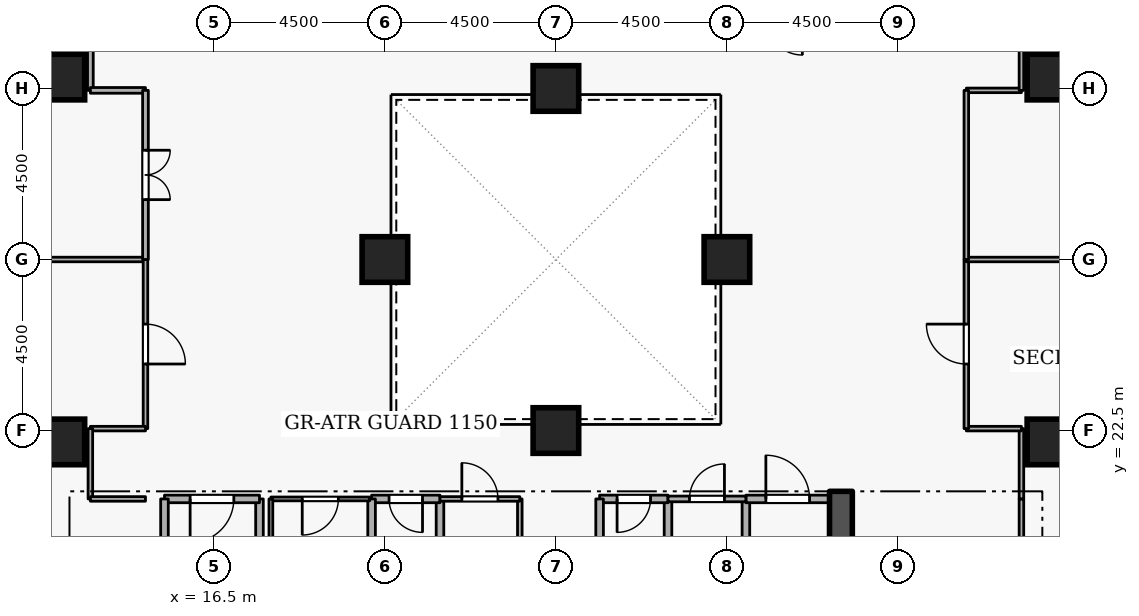
"""IFC4 building model, lengths in metres.
Left out: names, types, materials, properties, quantities, classifications, styles, units other than length and angle.
Written with IfcOpenShell. Run it as: python <this file> out.ifc"""

import sys

from ifc_helpers import new_model, si_unit, direction, frame, frame_2d, origin, origin_2d, place, context, subcontext, project, spatial, rectangle, extrude, element, fill, save


model = new_model("IFC4")
c1 = context("Model", 3, precision=1e-05, world=origin(), true_north=direction((0.0, 1.0)))
c2 = subcontext(c1, "Body", "Model", "MODEL_VIEW")
j1 = project(units=[si_unit("LENGTHUNIT", "METRE"), si_unit("PLANEANGLEUNIT", "RADIAN")], contexts=[c1])
p1 = place(None, origin())
s1 = spatial("IfcSite", under=j1, at=p1, CompositionType="ELEMENT")
p2 = place(p1, origin())
s2 = spatial("IfcBuilding", under=s1, at=p2, CompositionType="ELEMENT")
p3 = place(p2, frame((0.0, 0.0, 101.7)))
s3 = spatial("IfcBuildingStorey", under=s2, at=p3, CompositionType="ELEMENT", Elevation=101.7)
p4 = place(p3, frame((33.0, 15.2, 0.0), z_axis=(0.0, 0.0, 1.0), x_axis=(0.0, 1.0, 0.0)))
e1 = element("IfcWall", 1, at=p4, inside=s3, PredefinedType="SHEAR", context=c2, shape_type="SweptSolid", body=[
    extrude(rectangle(XDim=5.7, YDim=0.6, at=frame_2d((2.85, 0.0))), origin(), (0.0, 0.0, 1.0), 3.6),
])
for number, where, z_axis, x_axis in (
    (2, (12.5, 22.2, 0.0), (0.0, 0.0, 1.0), (1.0, 0.0, 0.0)),
    (3, (38.5, 22.2, 0.0), (0.0, 0.0, 1.0), (1.0, 0.0, 0.0)),
    (4, (12.5, 31.8, 0.0), (0.0, 0.0, 1.0), (1.0, 0.0, 0.0)),
    (5, (38.5, 31.8, 0.0), (0.0, 0.0, 1.0), (1.0, 0.0, 0.0)),
    (6, (25.5, 22.5, 0.0), (0.0, 0.0, 1.0), (1.0, 0.0, 0.0)),
    (7, (25.5, 31.5, 0.0), (0.0, 0.0, 1.0), (1.0, 0.0, 0.0)),
    (8, (21.0, 27.0, 0.0), (0.0, 0.0, 1.0), (1.0, 0.0, 0.0)),
    (9, (30.0, 27.0, 0.0), (0.0, 0.0, 1.0), (1.0, 0.0, 0.0)),
):
    element("IfcColumn", number, at=place(p3, frame(where, z_axis=z_axis, x_axis=x_axis)), inside=s3, PredefinedType="COLUMN", context=c2, shape_type="SweptSolid", body=[
        extrude(rectangle(XDim=1.2, YDim=1.2, at=origin_2d()), origin(), (0.0, 0.0, 1.0), 3.6),
    ])
p5 = place(p3, frame((17.7, 18.4, 0.0), z_axis=(0.0, 0.0, 1.0), x_axis=(0.0, 1.0, 0.0)))
e10 = element("IfcWall", 10, at=p5, inside=s3, PredefinedType="STANDARD", context=c2, shape_type="SweptSolid", body=[
    extrude(rectangle(XDim=2.3, YDim=0.2, at=frame_2d((1.15, 0.0))), origin(), (0.0, 0.0, 1.0), 2.545),
])
p6 = place(p3, frame((17.7, 20.7, 0.0), z_axis=(0.0, 0.0, 1.0), x_axis=(-1.0, 0.0, 0.0)))
e11 = element("IfcWall", 11, at=p6, inside=s3, PredefinedType="STANDARD", context=c2, shape_type="SweptSolid", body=[
    extrude(rectangle(XDim=2.5, YDim=0.2, at=frame_2d((1.25, 0.0))), origin(), (0.0, 0.0, 1.0), 3.34),
])
p7 = place(p6, frame((0.675, 0.0, 0.0)))
e12 = element("IfcOpeningElement", 12, at=p7, cuts=e11, PredefinedType="OPENING", context=c2, shape_type="SweptSolid", body=[
    extrude(rectangle(XDim=1.15, YDim=2.1, at=frame_2d((0.575, 1.05))), frame((0.0, 0.11, 0.0), z_axis=(0.0, -1.0, 0.0), x_axis=(1.0, 0.0, 0.0)), (0.0, 0.0, 1.0), 0.22),
])
p8 = place(p3, frame((15.2, 20.7, 0.0), z_axis=(0.0, 0.0, 1.0), x_axis=(0.0, -1.0, 0.0)))
e13 = element("IfcWall", 13, at=p8, inside=s3, PredefinedType="STANDARD", context=c2, shape_type="SweptSolid", body=[
    extrude(rectangle(XDim=5.7, YDim=0.2, at=frame_2d((2.85, 0.0))), origin(), (0.0, 0.0, 1.0), 3.34),
])
p9 = place(p3, frame((28.45, 18.65, 0.0), z_axis=(0.0, 0.0, 1.0), x_axis=(0.0, 1.0, 0.0)))
e14 = element("IfcWall", 14, at=p9, inside=s3, PredefinedType="STANDARD", context=c2, shape_type="SweptSolid", body=[
    extrude(rectangle(XDim=2.05, YDim=0.2, at=frame_2d((1.025, 0.0))), origin(), (0.0, 0.0, 1.0), 3.34),
])
p10 = place(p3, frame((28.45, 20.7, 0.0), z_axis=(0.0, 0.0, 1.0), x_axis=(-1.0, 0.0, 0.0)))
e15 = element("IfcWall", 15, at=p10, inside=s3, PredefinedType="STANDARD", context=c2, shape_type="SweptSolid", body=[
    extrude(rectangle(XDim=1.8, YDim=0.2, at=frame_2d((0.9, 0.0))), origin(), (0.0, 0.0, 1.0), 3.34),
])
p11 = place(p10, frame((0.46, 0.0, 0.0)))
e16 = element("IfcOpeningElement", 16, at=p11, cuts=e15, PredefinedType="OPENING", context=c2, shape_type="SweptSolid", body=[
    extrude(rectangle(XDim=0.88, YDim=2.04, at=frame_2d((0.44, 1.02))), frame((0.0, 0.11, 0.0), z_axis=(0.0, -1.0, 0.0), x_axis=(1.0, 0.0, 0.0)), (0.0, 0.0, 1.0), 0.22),
])
for number, where, z_axis, x_axis in (
    (17, (26.65, 20.7, 0.0), (0.0, 0.0, 1.0), (0.0, -1.0, 0.0)),
    (18, (22.45, 18.65, 0.0), (0.0, 0.0, 1.0), (0.0, 1.0, 0.0)),
):
    element("IfcWall", number, at=place(p3, frame(where, z_axis=z_axis, x_axis=x_axis)), inside=s3, PredefinedType="STANDARD", context=c2, shape_type="SweptSolid", body=[
        extrude(rectangle(XDim=2.05, YDim=0.2, at=frame_2d((1.025, 0.0))), origin(), (0.0, 0.0, 1.0), 3.34),
    ])
p12 = place(p3, frame((22.45, 20.7, 0.0), z_axis=(0.0, 0.0, 1.0), x_axis=(-1.0, 0.0, 0.0)))
e19 = element("IfcWall", 19, at=p12, inside=s3, PredefinedType="STANDARD", context=c2, shape_type="SweptSolid", body=[
    extrude(rectangle(XDim=1.8, YDim=0.2, at=frame_2d((0.9, 0.0))), origin(), (0.0, 0.0, 1.0), 3.34),
])
p13 = place(p12, frame((0.46, 0.0, 0.0)))
e20 = element("IfcOpeningElement", 20, at=p13, cuts=e19, PredefinedType="OPENING", context=c2, shape_type="SweptSolid", body=[
    extrude(rectangle(XDim=0.88, YDim=2.04, at=frame_2d((0.44, 1.02))), frame((0.0, 0.11, 0.0), z_axis=(0.0, -1.0, 0.0), x_axis=(1.0, 0.0, 0.0)), (0.0, 0.0, 1.0), 0.22),
])
for number, where, z_axis, x_axis in (
    (21, (20.65, 20.7, 0.0), (0.0, 0.0, 1.0), (0.0, -1.0, 0.0)),
    (22, (30.5, 18.65, 0.0), (0.0, 0.0, 1.0), (0.0, 1.0, 0.0)),
):
    element("IfcWall", number, at=place(p3, frame(where, z_axis=z_axis, x_axis=x_axis)), inside=s3, PredefinedType="STANDARD", context=c2, shape_type="SweptSolid", body=[
        extrude(rectangle(XDim=2.05, YDim=0.2, at=frame_2d((1.025, 0.0))), origin(), (0.0, 0.0, 1.0), 3.34),
    ])
p14 = place(p3, frame((30.5, 20.7, 0.0), z_axis=(0.0, 0.0, 1.0), x_axis=(1.0, 0.0, 0.0)))
e23 = element("IfcWall", 23, at=p14, inside=s3, PredefinedType="STANDARD", context=c2, shape_type="SweptSolid", body=[
    extrude(rectangle(XDim=2.2, YDim=0.2, at=frame_2d((1.1, 0.0))), origin(), (0.0, 0.0, 1.0), 3.34),
])
p15 = place(p14, frame((0.525, 0.0, 0.0)))
e24 = element("IfcOpeningElement", 24, at=p15, cuts=e23, PredefinedType="OPENING", context=c2, shape_type="SweptSolid", body=[
    extrude(rectangle(XDim=1.15, YDim=2.1, at=frame_2d((0.575, 1.05))), frame((0.0, 0.11, 0.0), z_axis=(0.0, -1.0, 0.0), x_axis=(1.0, 0.0, 0.0)), (0.0, 0.0, 1.0), 0.22),
])
p16 = place(p3, frame((20.6, 20.7, 0.0), z_axis=(0.0, 0.0, 1.0), x_axis=(-1.0, 0.0, 0.0)))
e25 = element("IfcWall", 25, at=p16, inside=s3, PredefinedType="PARTITIONING", context=c2, shape_type="SweptSolid", body=[
    extrude(rectangle(XDim=2.6, YDim=0.1, at=frame_2d((1.3, 0.0))), origin(), (0.0, 0.0, 1.0), 3.34),
])
p17 = place(p16, frame((0.825, 0.0, 0.0)))
e26 = element("IfcOpeningElement", 26, at=p17, cuts=e25, PredefinedType="OPENING", context=c2, shape_type="SweptSolid", body=[
    extrude(rectangle(XDim=0.95, YDim=2.1, at=frame_2d((0.475, 1.05))), frame((0.0, 0.06, 0.0), z_axis=(0.0, -1.0, 0.0), x_axis=(1.0, 0.0, 0.0)), (0.0, 0.0, 1.0), 0.12),
])
p18 = place(p3, frame((18.0, 20.7, 0.0), z_axis=(0.0, 0.0, 1.0), x_axis=(0.0, -1.0, 0.0)))
e27 = element("IfcWall", 27, at=p18, inside=s3, PredefinedType="PARTITIONING", context=c2, shape_type="SweptSolid", body=[
    extrude(rectangle(XDim=2.05, YDim=0.1, at=frame_2d((1.025, 0.0))), origin(), (0.0, 0.0, 1.0), 2.545),
])
p19 = place(p3, frame((24.55, 20.7, 0.0), z_axis=(0.0, 0.0, 1.0), x_axis=(0.0, -1.0, 0.0)))
e28 = element("IfcWall", 28, at=p19, inside=s3, PredefinedType="PARTITIONING", context=c2, shape_type="SweptSolid", body=[
    extrude(rectangle(XDim=2.05, YDim=0.12, at=frame_2d((1.025, 0.0))), origin(), (0.0, 0.0, 1.0), 3.34),
])
p20 = place(p3, frame((22.45, 20.7, 0.0), z_axis=(0.0, 0.0, 1.0), x_axis=(1.0, 0.0, 0.0)))
e29 = element("IfcWall", 29, at=p20, inside=s3, PredefinedType="PARTITIONING", context=c2, shape_type="SweptSolid", body=[
    extrude(rectangle(XDim=2.1, YDim=0.12, at=frame_2d((1.05, 0.0))), origin(), (0.0, 0.0, 1.0), 3.34),
])
p21 = place(p20, frame((0.575, 0.0, 0.0)))
e30 = element("IfcOpeningElement", 30, at=p21, cuts=e29, PredefinedType="OPENING", context=c2, shape_type="SweptSolid", body=[
    extrude(rectangle(XDim=0.95, YDim=2.1, at=frame_2d((0.475, 1.05))), frame((0.0, 0.07, 0.0), z_axis=(0.0, -1.0, 0.0), x_axis=(1.0, 0.0, 0.0)), (0.0, 0.0, 1.0), 0.14),
])
p22 = place(p3, frame((28.45, 20.7, 0.0), z_axis=(0.0, 0.0, 1.0), x_axis=(1.0, 0.0, 0.0)))
e31 = element("IfcWall", 31, at=p22, inside=s3, PredefinedType="PARTITIONING", context=c2, shape_type="SweptSolid", body=[
    extrude(rectangle(XDim=2.05, YDim=0.15, at=frame_2d((1.025, 0.0))), origin(), (0.0, 0.0, 1.0), 3.34),
])
p23 = place(p22, frame((0.565, 0.0, 0.0)))
e32 = element("IfcOpeningElement", 32, at=p23, cuts=e31, PredefinedType="OPENING", context=c2, shape_type="SweptSolid", body=[
    extrude(rectangle(XDim=0.92, YDim=2.08, at=frame_2d((0.46, 1.04))), frame((0.0, 0.085, 0.0), z_axis=(0.0, -1.0, 0.0), x_axis=(1.0, 0.0, 0.0)), (0.0, 0.0, 1.0), 0.17),
])
p24 = place(p3, frame((1.58, 27.0, 0.0), z_axis=(0.0, 0.0, 1.0), x_axis=(1.0, 0.0, 0.0)))
e33 = element("IfcWall", 33, at=p24, inside=s3, PredefinedType="PARTITIONING", context=c2, shape_type="SweptSolid", body=[
    extrude(rectangle(XDim=13.12, YDim=0.12, at=frame_2d((6.56, 0.0))), origin(), (0.0, 0.0, 1.0), 2.878),
])
p25 = place(p3, frame((14.7, 27.0, 0.0), z_axis=(0.0, 0.0, 1.0), x_axis=(0.0, -1.0, 0.0)))
e34 = element("IfcWall", 34, at=p25, inside=s3, PredefinedType="PARTITIONING", context=c2, shape_type="SweptSolid", body=[
    extrude(rectangle(XDim=4.45, YDim=0.12, at=frame_2d((2.225, 0.0))), origin(), (0.0, 0.0, 1.0), 3.34),
])
p26 = place(p25, frame((1.7, 0.0, 0.0)))
e35 = element("IfcOpeningElement", 35, at=p26, cuts=e34, PredefinedType="OPENING", context=c2, shape_type="SweptSolid", body=[
    extrude(rectangle(XDim=1.05, YDim=2.1, at=frame_2d((0.525, 1.05))), frame((0.0, 0.07, 0.0), z_axis=(0.0, -1.0, 0.0), x_axis=(1.0, 0.0, 0.0)), (0.0, 0.0, 1.0), 0.14),
])
p27 = place(p3, frame((14.7, 22.55, 0.0), z_axis=(0.0, 0.0, 1.0), x_axis=(-1.0, 0.0, 0.0)))
e36 = element("IfcWall", 36, at=p27, inside=s3, PredefinedType="PARTITIONING", context=c2, shape_type="SweptSolid", body=[
    extrude(rectangle(XDim=1.45, YDim=0.12, at=frame_2d((0.725, 0.0))), origin(), (0.0, 0.0, 1.0), 3.34),
])
p28 = place(p3, frame((13.25, 22.55, 0.0), z_axis=(0.0, 0.0, 1.0), x_axis=(0.0, -1.0, 0.0)))
e37 = element("IfcWall", 37, at=p28, inside=s3, PredefinedType="PARTITIONING", context=c2, shape_type="SweptSolid", body=[
    extrude(rectangle(XDim=1.85, YDim=0.12, at=frame_2d((0.925, 0.0))), origin(), (0.0, 0.0, 1.0), 3.34),
])
p29 = place(p3, frame((13.25, 20.7, 0.0), z_axis=(0.0, 0.0, 1.0), x_axis=(1.0, 0.0, 0.0)))
e38 = element("IfcWall", 38, at=p29, inside=s3, PredefinedType="PARTITIONING", context=c2, shape_type="SweptSolid", body=[
    extrude(rectangle(XDim=1.45, YDim=0.12, at=frame_2d((0.725, 0.0))), origin(), (0.0, 0.0, 1.0), 3.34),
])
p30 = place(p3, frame((13.25, 33.3, 0.0), z_axis=(0.0, 0.0, 1.0), x_axis=(0.0, -1.0, 0.0)))
e39 = element("IfcWall", 39, at=p30, inside=s3, PredefinedType="PARTITIONING", context=c2, shape_type="SweptSolid", body=[
    extrude(rectangle(XDim=1.85, YDim=0.15, at=frame_2d((0.925, 0.0))), origin(), (0.0, 0.0, 1.0), 3.34),
])
p31 = place(p3, frame((13.25, 31.45, 0.0), z_axis=(0.0, 0.0, 1.0), x_axis=(1.0, 0.0, 0.0)))
e40 = element("IfcWall", 40, at=p31, inside=s3, PredefinedType="PARTITIONING", context=c2, shape_type="SweptSolid", body=[
    extrude(rectangle(XDim=1.45, YDim=0.15, at=frame_2d((0.725, 0.0))), origin(), (0.0, 0.0, 1.0), 3.34),
])
p32 = place(p3, frame((14.7, 31.45, 0.0), z_axis=(0.0, 0.0, 1.0), x_axis=(0.0, -1.0, 0.0)))
e41 = element("IfcWall", 41, at=p32, inside=s3, PredefinedType="PARTITIONING", context=c2, shape_type="SweptSolid", body=[
    extrude(rectangle(XDim=4.45, YDim=0.15, at=frame_2d((2.225, 0.0))), origin(), (0.0, 0.0, 1.0), 3.34),
])
p33 = place(p32, frame((1.575, 0.0, 0.0)))
e42 = element("IfcOpeningElement", 42, at=p33, cuts=e41, PredefinedType="OPENING", context=c2, shape_type="SweptSolid", body=[
    extrude(rectangle(XDim=1.3, YDim=2.12, at=frame_2d((0.65, 1.06))), frame((0.0, 0.085, 0.0), z_axis=(0.0, -1.0, 0.0), x_axis=(1.0, 0.0, 0.0)), (0.0, 0.0, 1.0), 0.17),
])
p34 = place(p3, frame((37.75, 17.55, 0.0), z_axis=(0.0, 0.0, 1.0), x_axis=(0.0, 1.0, 0.0)))
e43 = element("IfcWall", 43, at=p34, inside=s3, PredefinedType="PARTITIONING", context=c2, shape_type="SweptSolid", body=[
    extrude(rectangle(XDim=3.15, YDim=0.12, at=frame_2d((1.575, 0.0))), origin(), (0.0, 0.0, 1.0), 3.34),
])
p35 = place(p3, frame((37.75, 20.7, 0.0), z_axis=(0.0, 0.0, 1.0), x_axis=(0.0, 1.0, 0.0)))
e44 = element("IfcWall", 44, at=p35, inside=s3, PredefinedType="PARTITIONING", context=c2, shape_type="SweptSolid", body=[
    extrude(rectangle(XDim=1.85, YDim=0.12, at=frame_2d((0.925, 0.0))), origin(), (0.0, 0.0, 1.0), 3.34),
])
p36 = place(p3, frame((37.75, 22.55, 0.0), z_axis=(0.0, 0.0, 1.0), x_axis=(-1.0, 0.0, 0.0)))
e45 = element("IfcWall", 45, at=p36, inside=s3, PredefinedType="PARTITIONING", context=c2, shape_type="SweptSolid", body=[
    extrude(rectangle(XDim=1.45, YDim=0.12, at=frame_2d((0.725, 0.0))), origin(), (0.0, 0.0, 1.0), 3.34),
])
p37 = place(p3, frame((36.3, 22.55, 0.0), z_axis=(0.0, 0.0, 1.0), x_axis=(0.0, 1.0, 0.0)))
e46 = element("IfcWall", 46, at=p37, inside=s3, PredefinedType="PARTITIONING", context=c2, shape_type="SweptSolid", body=[
    extrude(rectangle(XDim=4.45, YDim=0.12, at=frame_2d((2.225, 0.0))), origin(), (0.0, 0.0, 1.0), 3.34),
])
p38 = place(p37, frame((1.7, 0.0, 0.0)))
e47 = element("IfcOpeningElement", 47, at=p38, cuts=e46, PredefinedType="OPENING", context=c2, shape_type="SweptSolid", body=[
    extrude(rectangle(XDim=1.05, YDim=2.1, at=frame_2d((0.525, 1.05))), frame((0.0, 0.07, 0.0), z_axis=(0.0, -1.0, 0.0), x_axis=(1.0, 0.0, 0.0)), (0.0, 0.0, 1.0), 0.14),
])
p39 = place(p3, frame((36.3, 27.0, 0.0), z_axis=(0.0, 0.0, 1.0), x_axis=(1.0, 0.0, 0.0)))
e48 = element("IfcWall", 48, at=p39, inside=s3, PredefinedType="PARTITIONING", context=c2, shape_type="SweptSolid", body=[
    extrude(rectangle(XDim=7.12, YDim=0.12, at=frame_2d((3.56, 0.0))), origin(), (0.0, 0.0, 1.0), 2.878),
])
p40 = place(p3, frame((36.3, 31.45, 0.0), z_axis=(0.0, 0.0, 1.0), x_axis=(1.0, 0.0, 0.0)))
e49 = element("IfcWall", 49, at=p40, inside=s3, PredefinedType="PARTITIONING", context=c2, shape_type="SweptSolid", body=[
    extrude(rectangle(XDim=1.45, YDim=0.12, at=frame_2d((0.725, 0.0))), origin(), (0.0, 0.0, 1.0), 3.34),
])
p41 = place(p3, frame((37.75, 31.45, 0.0), z_axis=(0.0, 0.0, 1.0), x_axis=(0.0, 1.0, 0.0)))
e50 = element("IfcWall", 50, at=p41, inside=s3, PredefinedType="PARTITIONING", context=c2, shape_type="SweptSolid", body=[
    extrude(rectangle(XDim=1.85, YDim=0.12, at=frame_2d((0.925, 0.0))), origin(), (0.0, 0.0, 1.0), 3.34),
])
p42 = place(p3, frame((36.3, 27.0, 0.0), z_axis=(0.0, 0.0, 1.0), x_axis=(0.0, 1.0, 0.0)))
e51 = element("IfcWall", 51, at=p42, inside=s3, PredefinedType="PARTITIONING", context=c2, shape_type="SweptSolid", body=[
    extrude(rectangle(XDim=4.45, YDim=0.12, at=frame_2d((2.225, 0.0))), origin(), (0.0, 0.0, 1.0), 3.34),
])
p43 = place(p7, origin())
e52 = element("IfcDoor", 52, at=p43, inside=s3, OperationType="SINGLE_SWING_RIGHT", PredefinedType="DOOR", context=c2, shape_type="SweptSolid", body=[
    extrude(rectangle(XDim=1.15, YDim=2.1, at=frame_2d((0.575, 1.05))), frame((0.0, 0.025, 0.0), z_axis=(0.0, -1.0, 0.0), x_axis=(1.0, 0.0, 0.0)), (0.0, 0.0, 1.0), 0.05),
])
fill(e12, e52)
p44 = place(p11, origin())
e53 = element("IfcDoor", 53, at=p44, inside=s3, OperationType="SINGLE_SWING_RIGHT", PredefinedType="DOOR", context=c2, shape_type="SweptSolid", body=[
    extrude(rectangle(XDim=0.88, YDim=2.04, at=frame_2d((0.44, 1.02))), frame((0.0, 0.025, 0.0), z_axis=(0.0, -1.0, 0.0), x_axis=(1.0, 0.0, 0.0)), (0.0, 0.0, 1.0), 0.05),
])
fill(e16, e53)
p45 = place(p13, origin())
e54 = element("IfcDoor", 54, at=p45, inside=s3, OperationType="SINGLE_SWING_LEFT", PredefinedType="DOOR", context=c2, shape_type="SweptSolid", body=[
    extrude(rectangle(XDim=0.88, YDim=2.04, at=frame_2d((0.44, 1.02))), frame((0.0, 0.025, 0.0), z_axis=(0.0, -1.0, 0.0), x_axis=(1.0, 0.0, 0.0)), (0.0, 0.0, 1.0), 0.05),
])
fill(e20, e54)
p46 = place(p17, origin())
e55 = element("IfcDoor", 55, at=p46, inside=s3, OperationType="SINGLE_SWING_RIGHT", PredefinedType="DOOR", context=c2, shape_type="SweptSolid", body=[
    extrude(rectangle(XDim=0.95, YDim=2.1, at=frame_2d((0.475, 1.05))), frame((0.0, 0.025, 0.0), z_axis=(0.0, -1.0, 0.0), x_axis=(1.0, 0.0, 0.0)), (0.0, 0.0, 1.0), 0.05),
])
fill(e26, e55)
p47 = place(p21, origin())
e56 = element("IfcDoor", 56, at=p47, inside=s3, OperationType="SINGLE_SWING_LEFT", PredefinedType="DOOR", context=c2, shape_type="SweptSolid", body=[
    extrude(rectangle(XDim=0.95, YDim=2.1, at=frame_2d((0.475, 1.05))), frame((0.0, 0.025, 0.0), z_axis=(0.0, -1.0, 0.0), x_axis=(1.0, 0.0, 0.0)), (0.0, 0.0, 1.0), 0.05),
])
fill(e30, e56)
p48 = place(p23, origin())
e57 = element("IfcDoor", 57, at=p48, inside=s3, OperationType="SINGLE_SWING_RIGHT", PredefinedType="DOOR", context=c2, shape_type="SweptSolid", body=[
    extrude(rectangle(XDim=0.92, YDim=2.08, at=frame_2d((0.46, 1.04))), frame((0.0, 0.025, 0.0), z_axis=(0.0, -1.0, 0.0), x_axis=(1.0, 0.0, 0.0)), (0.0, 0.0, 1.0), 0.05),
])
fill(e32, e57)
p49 = place(p15, origin())
e58 = element("IfcDoor", 58, at=p49, inside=s3, OperationType="SINGLE_SWING_LEFT", PredefinedType="DOOR", context=c2, shape_type="SweptSolid", body=[
    extrude(rectangle(XDim=1.15, YDim=2.1, at=frame_2d((0.575, 1.05))), frame((0.0, 0.025, 0.0), z_axis=(0.0, -1.0, 0.0), x_axis=(1.0, 0.0, 0.0)), (0.0, 0.0, 1.0), 0.05),
])
fill(e24, e58)
p50 = place(p26, origin())
e59 = element("IfcDoor", 59, at=p50, inside=s3, OperationType="SINGLE_SWING_RIGHT", PredefinedType="DOOR", context=c2, shape_type="SweptSolid", body=[
    extrude(rectangle(XDim=1.05, YDim=2.1, at=frame_2d((0.525, 1.05))), frame((0.0, 0.025, 0.0), z_axis=(0.0, -1.0, 0.0), x_axis=(1.0, 0.0, 0.0)), (0.0, 0.0, 1.0), 0.05),
])
fill(e35, e59)
p51 = place(p33, origin())
e60 = element("IfcDoor", 60, at=p51, inside=s3, OperationType="DOUBLE_DOOR_SINGLE_SWING", PredefinedType="DOOR", context=c2, shape_type="SweptSolid", body=[
    extrude(rectangle(XDim=1.3, YDim=2.12, at=frame_2d((0.65, 1.06))), frame((0.0, 0.025, 0.0), z_axis=(0.0, -1.0, 0.0), x_axis=(1.0, 0.0, 0.0)), (0.0, 0.0, 1.0), 0.05),
])
fill(e42, e60)
p52 = place(p38, origin())
e61 = element("IfcDoor", 61, at=p52, inside=s3, OperationType="SINGLE_SWING_RIGHT", PredefinedType="DOOR", context=c2, shape_type="SweptSolid", body=[
    extrude(rectangle(XDim=1.05, YDim=2.1, at=frame_2d((0.525, 1.05))), frame((0.0, 0.025, 0.0), z_axis=(0.0, -1.0, 0.0), x_axis=(1.0, 0.0, 0.0)), (0.0, 0.0, 1.0), 0.05),
])
fill(e47, e61)
save(model, sys.argv[1])
